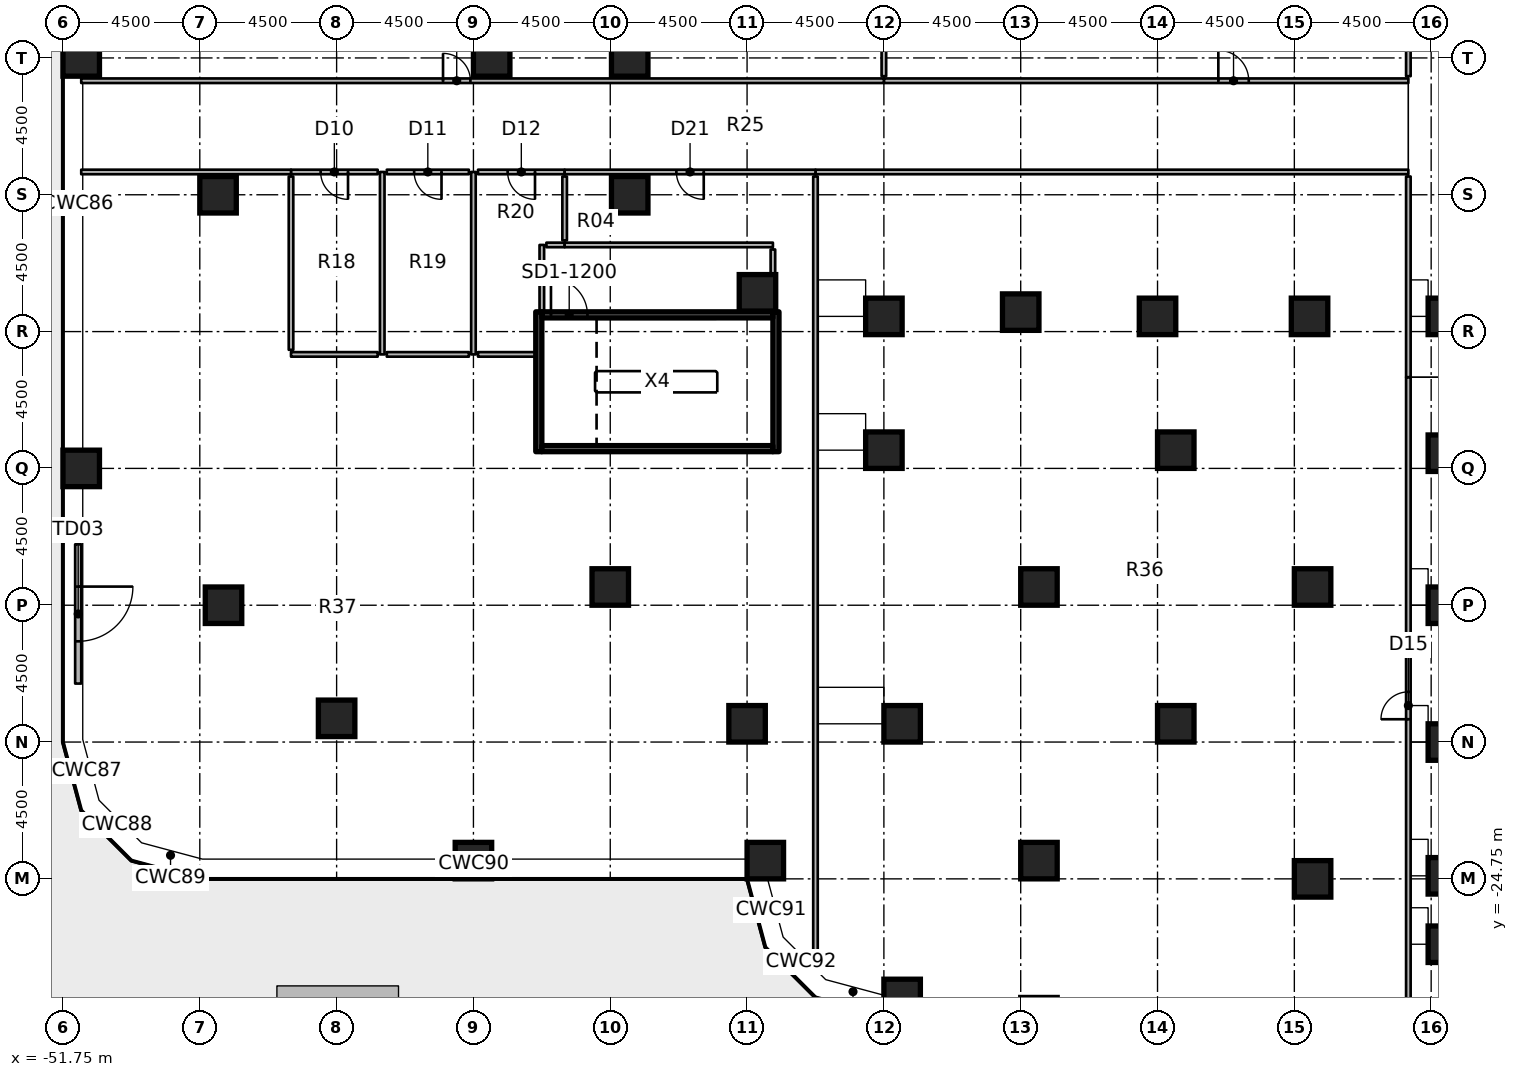
"""IFC4 building model, lengths in metres.
Left out: names, types, materials, properties, quantities, classifications, styles, units other than length and angle.
Written with IfcOpenShell. Run it as: python <this file> out.ifc"""

import sys

from ifc_helpers import new_model, si_unit, direction, frame, frame_2d, origin, origin_2d, place, context, subcontext, project, spatial, rectangle, extrude, element, fill, save


model = new_model("IFC4")
c1 = context("Model", 3, precision=1e-05, world=origin(), true_north=direction((0.0, 1.0)))
c2 = subcontext(c1, "Body", "Model", "MODEL_VIEW")
j1 = project(units=[si_unit("LENGTHUNIT", "METRE"), si_unit("PLANEANGLEUNIT", "RADIAN")], contexts=[c1])
p1 = place(None, origin())
s1 = spatial("IfcSite", under=j1, at=p1, CompositionType="ELEMENT")
p2 = place(p1, origin())
s2 = spatial("IfcBuilding", under=s1, at=p2, CompositionType="ELEMENT")
p3 = place(p2, frame((0.0, 0.0, 7.0)))
s3 = spatial("IfcBuildingStorey", under=s2, at=p3, CompositionType="ELEMENT", Elevation=7.0)
for number, where, z_axis, x_axis in (
    (1, (-51.15, -11.25, 0.0), (0.0, 0.0, 1.0), (1.0, 0.0, 0.0)),
    (2, (-51.15, 2.25, 0.0), (0.0, 0.0, 1.0), (1.0, 0.0, 0.0)),
    (3, (-46.47, -15.75, 0.0), (0.0, 0.0, 1.0), (1.0, 0.0, 0.0)),
    (4, (-46.65, -2.25, 0.0), (0.0, 0.0, 1.0), (1.0, 0.0, 0.0)),
    (5, (-42.75, -19.47, 0.0), (0.0, 0.0, 1.0), (1.0, 0.0, 0.0)),
    (6, (-38.25, -24.15, 0.0), (0.0, 0.0, 1.0), (1.0, 0.0, 0.0)),
    (7, (-37.65, 2.25, 0.0), (0.0, 0.0, 1.0), (1.0, 0.0, 0.0)),
    (8, (-33.75, -15.15, 0.0), (0.0, 0.0, 1.0), (1.0, 0.0, 0.0)),
    (9, (-33.11, -2.25, 0.0), (0.0, 0.0, 1.0), (1.0, 0.0, 0.0)),
    (10, (-33.11, 2.25, 0.0), (0.0, 0.0, 1.0), (1.0, 0.0, 0.0)),
    (11, (-28.65, -24.15, 0.0), (0.0, 0.0, 1.0), (1.0, 0.0, 0.0)),
    (12, (-29.25, -19.65, 0.0), (0.0, 0.0, 1.0), (1.0, 0.0, 0.0)),
    (13, (-28.908, -5.475, 0.0), (0.0, 0.0, 1.0), (1.0, 0.0, 0.0)),
    (14, (-24.15, -28.65, 0.0), (0.0, 0.0, 1.0), (1.0, 0.0, 0.0)),
    (15, (-24.15, -19.65, 0.0), (0.0, 0.0, 1.0), (1.0, 0.0, 0.0)),
    (16, (-24.75, -10.65, 0.0), (0.0, 0.0, 1.0), (1.0, 0.0, 0.0)),
    (17, (-24.75, -6.25, 0.0), (0.0, 0.0, 1.0), (1.0, 0.0, 0.0)),
    (18, (-19.65, -29.25, 0.0), (0.0, 0.0, 1.0), (1.0, 0.0, 0.0)),
    (19, (-19.65, -24.15, 0.0), (0.0, 0.0, 1.0), (1.0, 0.0, 0.0)),
    (20, (-19.65, -15.15, 0.0), (0.0, 0.0, 1.0), (1.0, 0.0, 0.0)),
    (21, (-20.25, -6.11, 0.0), (0.0, 0.0, 1.0), (1.0, 0.0, 0.0)),
    (22, (-15.15, -19.65, 0.0), (0.0, 0.0, 1.0), (1.0, 0.0, 0.0)),
    (23, (-15.15, -10.65, 0.0), (0.0, 0.0, 1.0), (1.0, 0.0, 0.0)),
    (24, (-15.75, -6.25, 0.0), (0.0, 0.0, 1.0), (1.0, 0.0, 0.0)),
    (25, (-10.65, -24.75, 0.0), (0.0, 0.0, 1.0), (1.0, 0.0, 0.0)),
    (26, (-10.65, -15.15, 0.0), (0.0, 0.0, 1.0), (1.0, 0.0, 0.0)),
    (27, (-10.75, -6.25, 0.0), (0.0, 0.0, 1.0), (1.0, 0.0, 0.0)),
    (28, (-6.25, -26.9, 0.0), (0.0, 0.0, 1.0), (1.0, 0.0, 0.0)),
    (29, (-6.25, -24.65, 0.0), (0.0, 0.0, 1.0), (1.0, 0.0, 0.0)),
    (30, (-6.25, -20.25, 0.0), (0.0, 0.0, 1.0), (1.0, 0.0, 0.0)),
    (31, (-6.25, -15.75, 0.0), (0.0, 0.0, 1.0), (1.0, 0.0, 0.0)),
    (32, (-6.25, -10.75, 0.0), (0.0, 0.0, 1.0), (1.0, 0.0, 0.0)),
    (33, (-6.25, -6.25, 0.0), (0.0, 0.0, 1.0), (1.0, 0.0, 0.0)),
):
    element("IfcColumn", number, at=place(p3, frame(where, z_axis=z_axis, x_axis=x_axis)), inside=s3, PredefinedType="COLUMN", context=c2, shape_type="SweptSolid", body=[
        extrude(rectangle(XDim=1.2, YDim=1.2, at=origin_2d()), origin(), (0.0, 0.0, 1.0), 4.55),
    ])
p4 = place(p3, frame((-51.25, -13.747, 0.0), z_axis=(0.0, 0.0, 1.0), x_axis=(0.0, -1.0, 0.0)))
e34 = element("IfcWall", 34, at=p4, inside=s3, PredefinedType="SOLIDWALL", context=c2, shape_type="SweptSolid", body=[
    extrude(rectangle(XDim=4.58, YDim=0.2, at=frame_2d((2.29, 0.0))), origin(), (0.0, 0.0, 1.0), 4.55),
])
p5 = place(p4, frame((1.39, 0.0, 0.0)))
e35 = element("IfcOpeningElement", 35, at=p5, cuts=e34, PredefinedType="OPENING", context=c2, shape_type="SweptSolid", body=[
    extrude(rectangle(XDim=1.8, YDim=2.4, at=frame_2d((0.9, 1.2))), frame((0.0, 0.11, 0.0), z_axis=(0.0, -1.0, 0.0), x_axis=(1.0, 0.0, 0.0)), (0.0, 0.0, 1.0), 0.22),
])
for number, where, z_axis, x_axis in (
    (36, (-36.1, -10.7, 0.0), (0.0, 0.0, 1.0), (0.0, 1.0, 0.0)),
    (37, (-28.3, -10.7, 0.0), (0.0, 0.0, 1.0), (0.0, 1.0, 0.0)),
):
    element("IfcWall", number, at=place(p3, frame(where, z_axis=z_axis, x_axis=x_axis)), inside=s3, PredefinedType="SHEAR", context=c2, shape_type="SweptSolid", body=[
        extrude(rectangle(XDim=4.6, YDim=0.2, at=frame_2d((2.3, 0.0))), origin(), (0.0, 0.0, 1.0), 4.55),
    ])
p6 = place(p3, frame((-36.0, -10.6, 0.0), z_axis=(0.0, 0.0, 1.0), x_axis=(1.0, 0.0, 0.0)))
e38 = element("IfcWall", 38, at=p6, inside=s3, PredefinedType="SHEAR", context=c2, shape_type="SweptSolid", body=[
    extrude(rectangle(XDim=7.6, YDim=0.2, at=frame_2d((3.8, 0.0))), origin(), (0.0, 0.0, 1.0), 4.55),
])
p7 = place(p3, frame((-36.0, -6.2, 0.0), z_axis=(0.0, 0.0, 1.0), x_axis=(1.0, 0.0, 0.0)))
e39 = element("IfcWall", 39, at=p7, inside=s3, PredefinedType="SHEAR", context=c2, shape_type="SweptSolid", body=[
    extrude(rectangle(XDim=7.6, YDim=0.2, at=frame_2d((3.8, 0.0))), origin(), (0.0, 0.0, 1.0), 4.55),
])
p8 = place(p7, frame((0.3, 0.0, 0.0)))
e40 = element("IfcOpeningElement", 40, at=p8, cuts=e39, PredefinedType="OPENING", context=c2, shape_type="SweptSolid", body=[
    extrude(rectangle(XDim=1.2, YDim=2.1, at=frame_2d((0.6, 1.05))), frame((0.0, 0.11, 0.0), z_axis=(0.0, -1.0, 0.0), x_axis=(1.0, 0.0, 0.0)), (0.0, 0.0, 1.0), 0.22),
])
p9 = place(p3, frame((-36.0, -6.1, 0.0), z_axis=(0.0, 0.0, 1.0), x_axis=(0.0, 1.0, 0.0)))
e41 = element("IfcWall", 41, at=p9, inside=s3, PredefinedType="PARTITIONING", context=c2, shape_type="SweptSolid", body=[
    extrude(rectangle(XDim=2.2, YDim=0.15, at=frame_2d((1.1, 0.0))), origin(), (0.0, 0.0, 1.0), 4.55),
])
p10 = place(p3, frame((-35.85, -3.9, 0.0), z_axis=(0.0, 0.0, 1.0), x_axis=(1.0, 0.0, 0.0)))
e42 = element("IfcWall", 42, at=p10, inside=s3, PredefinedType="PARTITIONING", context=c2, shape_type="SweptSolid", body=[
    extrude(rectangle(XDim=0.6, YDim=0.15, at=frame_2d((0.3, 0.0))), origin(), (0.0, 0.0, 1.0), 4.55),
])
p11 = place(p3, frame((-35.25, -3.9, 0.0), z_axis=(0.0, 0.0, 1.0), x_axis=(1.0, 0.0, 0.0)))
e43 = element("IfcWall", 43, at=p11, inside=s3, PredefinedType="PARTITIONING", context=c2, shape_type="SweptSolid", body=[
    extrude(rectangle(XDim=6.85, YDim=0.15, at=frame_2d((3.425, 0.0))), origin(), (0.0, 0.0, 1.0), 4.55),
])
p12 = place(p3, frame((-28.4, -4.05, 0.0), z_axis=(0.0, 0.0, 1.0), x_axis=(0.0, -1.0, 0.0)))
e44 = element("IfcWall", 44, at=p12, inside=s3, PredefinedType="PARTITIONING", context=c2, shape_type="SweptSolid", body=[
    extrude(rectangle(XDim=0.825, YDim=0.15, at=frame_2d((0.413, 0.0))), origin(), (0.0, 0.0, 1.0), 4.55),
])
p13 = place(p3, frame((-41.25, -1.5, 0.0), z_axis=(0.0, 0.0, 1.0), x_axis=(0.0, -1.0, 0.0)))
e45 = element("IfcWall", 45, at=p13, inside=s3, PredefinedType="PARTITIONING", context=c2, shape_type="SweptSolid", body=[
    extrude(rectangle(XDim=6.0, YDim=0.15, at=frame_2d((3.0, 0.0))), origin(), (0.0, 0.0, 1.0), 4.55),
])
p14 = place(p3, frame((-41.4, -1.5, 0.0), z_axis=(0.0, 0.0, 1.0), x_axis=(-1.0, 0.0, 0.0)))
e46 = element("IfcWall", 46, at=p14, inside=s3, PredefinedType="PARTITIONING", context=c2, shape_type="SweptSolid", body=[
    extrude(rectangle(XDim=2.85, YDim=0.15, at=frame_2d((1.425, 0.0))), origin(), (0.0, 0.0, 1.0), 4.55),
])
p15 = place(p14, frame((0.975, 0.0, 0.0)))
e47 = element("IfcOpeningElement", 47, at=p15, cuts=e46, PredefinedType="OPENING", context=c2, shape_type="SweptSolid", body=[
    extrude(rectangle(XDim=0.9, YDim=2.1, at=frame_2d((0.45, 1.05))), frame((0.0, 0.085, 0.0), z_axis=(0.0, -1.0, 0.0), x_axis=(1.0, 0.0, 0.0)), (0.0, 0.0, 1.0), 0.17),
])
p16 = place(p3, frame((-41.4, -7.5, 0.0), z_axis=(0.0, 0.0, 1.0), x_axis=(-1.0, 0.0, 0.0)))
e48 = element("IfcWall", 48, at=p16, inside=s3, PredefinedType="PARTITIONING", context=c2, shape_type="SweptSolid", body=[
    extrude(rectangle(XDim=2.85, YDim=0.15, at=frame_2d((1.425, 0.0))), origin(), (0.0, 0.0, 1.0), 4.55),
])
p17 = place(p3, frame((-44.25, -7.35, 0.0), z_axis=(0.0, 0.0, 1.0), x_axis=(0.0, 1.0, 0.0)))
e49 = element("IfcWall", 49, at=p17, inside=s3, PredefinedType="PARTITIONING", context=c2, shape_type="SweptSolid", body=[
    extrude(rectangle(XDim=5.7, YDim=0.15, at=frame_2d((2.85, 0.0))), origin(), (0.0, 0.0, 1.0), 4.55),
])
p18 = place(p3, frame((-38.25, -1.5, 0.0), z_axis=(0.0, 0.0, 1.0), x_axis=(0.0, -1.0, 0.0)))
e50 = element("IfcWall", 50, at=p18, inside=s3, PredefinedType="PARTITIONING", context=c2, shape_type="SweptSolid", body=[
    extrude(rectangle(XDim=6.0, YDim=0.15, at=frame_2d((3.0, 0.0))), origin(), (0.0, 0.0, 1.0), 4.55),
])
p19 = place(p3, frame((-38.4, -1.5, 0.0), z_axis=(0.0, 0.0, 1.0), x_axis=(-1.0, 0.0, 0.0)))
e51 = element("IfcWall", 51, at=p19, inside=s3, PredefinedType="PARTITIONING", context=c2, shape_type="SweptSolid", body=[
    extrude(rectangle(XDim=2.7, YDim=0.15, at=frame_2d((1.35, 0.0))), origin(), (0.0, 0.0, 1.0), 4.55),
])
p20 = place(p19, frame((0.9, 0.0, 0.0)))
e52 = element("IfcOpeningElement", 52, at=p20, cuts=e51, PredefinedType="OPENING", context=c2, shape_type="SweptSolid", body=[
    extrude(rectangle(XDim=0.9, YDim=2.1, at=frame_2d((0.45, 1.05))), frame((0.0, 0.085, 0.0), z_axis=(0.0, -1.0, 0.0), x_axis=(1.0, 0.0, 0.0)), (0.0, 0.0, 1.0), 0.17),
])
p21 = place(p3, frame((-38.4, -7.5, 0.0), z_axis=(0.0, 0.0, 1.0), x_axis=(-1.0, 0.0, 0.0)))
e53 = element("IfcWall", 53, at=p21, inside=s3, PredefinedType="PARTITIONING", context=c2, shape_type="SweptSolid", body=[
    extrude(rectangle(XDim=2.7, YDim=0.15, at=frame_2d((1.35, 0.0))), origin(), (0.0, 0.0, 1.0), 4.55),
])
p22 = place(p3, frame((-35.25, -1.5, 0.0), z_axis=(0.0, 0.0, 1.0), x_axis=(-1.0, 0.0, 0.0)))
e54 = element("IfcWall", 54, at=p22, inside=s3, PredefinedType="PARTITIONING", context=c2, shape_type="SweptSolid", body=[
    extrude(rectangle(XDim=2.85, YDim=0.15, at=frame_2d((1.425, 0.0))), origin(), (0.0, 0.0, 1.0), 4.55),
])
p23 = place(p22, frame((0.975, 0.0, 0.0)))
e55 = element("IfcOpeningElement", 55, at=p23, cuts=e54, PredefinedType="OPENING", context=c2, shape_type="SweptSolid", body=[
    extrude(rectangle(XDim=0.9, YDim=2.1, at=frame_2d((0.45, 1.05))), frame((0.0, 0.085, 0.0), z_axis=(0.0, -1.0, 0.0), x_axis=(1.0, 0.0, 0.0)), (0.0, 0.0, 1.0), 0.17),
])
p24 = place(p3, frame((-36.2, -7.5, 0.0), z_axis=(0.0, 0.0, 1.0), x_axis=(-1.0, 0.0, 0.0)))
e56 = element("IfcWall", 56, at=p24, inside=s3, PredefinedType="PARTITIONING", context=c2, shape_type="SweptSolid", body=[
    extrude(rectangle(XDim=1.9, YDim=0.15, at=frame_2d((0.95, 0.0))), origin(), (0.0, 0.0, 1.0), 4.55),
])
p25 = place(p3, frame((-35.25, -1.65, 0.0), z_axis=(0.0, 0.0, 1.0), x_axis=(0.0, -1.0, 0.0)))
e57 = element("IfcWall", 57, at=p25, inside=s3, PredefinedType="PARTITIONING", context=c2, shape_type="SweptSolid", body=[
    extrude(rectangle(XDim=2.1, YDim=0.15, at=frame_2d((1.05, 0.0))), origin(), (0.0, 0.0, 1.0), 4.55),
])
p26 = place(p3, frame((-7.5, -32.25, 0.0), z_axis=(0.0, 0.0, 1.0), x_axis=(0.0, 1.0, 0.0)))
e58 = element("IfcWall", 58, at=p26, inside=s3, PredefinedType="PARTITIONING", context=c2, shape_type="SweptSolid", body=[
    extrude(rectangle(XDim=24.0, YDim=0.15, at=frame_2d((12.0, 0.0))), origin(), (0.0, 0.0, 1.0), 4.55),
])
p27 = place(p26, frame((12.75, 0.0, 0.0)))
e59 = element("IfcOpeningElement", 59, at=p27, cuts=e58, PredefinedType="OPENING", context=c2, shape_type="SweptSolid", body=[
    extrude(rectangle(XDim=0.9, YDim=2.1, at=frame_2d((0.45, 1.05))), frame((0.0, 0.085, 0.0), z_axis=(0.0, -1.0, 0.0), x_axis=(1.0, 0.0, 0.0)), (0.0, 0.0, 1.0), 0.17),
])
p28 = place(p3, frame((-24.75, 1.5, 0.0), z_axis=(0.0, 0.0, 1.0), x_axis=(1.0, 0.0, 0.0)))
e60 = element("IfcWall", 60, at=p28, inside=s3, PredefinedType="PARTITIONING", context=c2, shape_type="SweptSolid", body=[
    extrude(rectangle(XDim=17.25, YDim=0.15, at=frame_2d((8.625, 0.0))), origin(), (0.0, 0.0, 1.0), 4.55),
])
p29 = place(p28, frame((11.0, 0.0, 0.0)))
e61 = element("IfcOpeningElement", 61, at=p29, cuts=e60, PredefinedType="OPENING", context=c2, shape_type="SweptSolid", body=[
    extrude(rectangle(XDim=1.0, YDim=2.1, at=frame_2d((0.5, 1.05))), frame((0.0, 0.085, 0.0), z_axis=(0.0, -1.0, 0.0), x_axis=(1.0, 0.0, 0.0)), (0.0, 0.0, 1.0), 0.17),
])
p30 = place(p3, frame((-51.15, 1.5, 0.0), z_axis=(0.0, 0.0, 1.0), x_axis=(1.0, 0.0, 0.0)))
e62 = element("IfcWall", 62, at=p30, inside=s3, PredefinedType="PARTITIONING", context=c2, shape_type="SweptSolid", body=[
    extrude(rectangle(XDim=26.4, YDim=0.15, at=frame_2d((13.2, 0.0))), origin(), (0.0, 0.0, 1.0), 4.55),
])
p31 = place(p30, frame((11.9, 0.0, 0.0)))
e63 = element("IfcOpeningElement", 63, at=p31, cuts=e62, PredefinedType="OPENING", context=c2, shape_type="SweptSolid", body=[
    extrude(rectangle(XDim=0.9, YDim=2.1, at=frame_2d((0.45, 1.05))), frame((0.0, 0.085, 0.0), z_axis=(0.0, -1.0, 0.0), x_axis=(1.0, 0.0, 0.0)), (0.0, 0.0, 1.0), 0.17),
])
p32 = place(p3, frame((-7.5, -1.5, 0.0), z_axis=(0.0, 0.0, 1.0), x_axis=(-1.0, 0.0, 0.0)))
e64 = element("IfcWall", 64, at=p32, inside=s3, PredefinedType="PARTITIONING", context=c2, shape_type="SweptSolid", body=[
    extrude(rectangle(XDim=19.5, YDim=0.15, at=frame_2d((9.75, 0.0))), origin(), (0.0, 0.0, 1.0), 4.55),
])
p33 = place(p3, frame((-44.25, -1.5, 0.0), z_axis=(0.0, 0.0, 1.0), x_axis=(-1.0, 0.0, 0.0)))
e65 = element("IfcWall", 65, at=p33, inside=s3, PredefinedType="PARTITIONING", context=c2, shape_type="SweptSolid", body=[
    extrude(rectangle(XDim=6.9, YDim=0.15, at=frame_2d((3.45, 0.0))), origin(), (0.0, 0.0, 1.0), 4.55),
])
p34 = place(p3, frame((-27.0, -1.5, 0.0), z_axis=(0.0, 0.0, 1.0), x_axis=(-1.0, 0.0, 0.0)))
e66 = element("IfcWall", 66, at=p34, inside=s3, PredefinedType="PARTITIONING", context=c2, shape_type="SweptSolid", body=[
    extrude(rectangle(XDim=8.25, YDim=0.15, at=frame_2d((4.125, 0.0))), origin(), (0.0, 0.0, 1.0), 4.55),
])
p35 = place(p34, frame((3.675, 0.0, 0.0)))
e67 = element("IfcOpeningElement", 67, at=p35, cuts=e66, PredefinedType="OPENING", context=c2, shape_type="SweptSolid", body=[
    extrude(rectangle(XDim=0.9, YDim=2.1, at=frame_2d((0.45, 1.05))), frame((0.0, 0.085, 0.0), z_axis=(0.0, -1.0, 0.0), x_axis=(1.0, 0.0, 0.0)), (0.0, 0.0, 1.0), 0.17),
])
p36 = place(p3, frame((-24.75, 1.65, 0.0), z_axis=(0.0, 0.0, 1.0), x_axis=(0.0, 1.0, 0.0)))
e68 = element("IfcWall", 68, at=p36, inside=s3, PredefinedType="PARTITIONING", context=c2, shape_type="SweptSolid", body=[
    extrude(rectangle(XDim=4.0, YDim=0.15, at=frame_2d((2.0, 0.0))), origin(), (0.0, 0.0, 1.0), 4.55),
])
p37 = place(p3, frame((-7.5, 8.25, 0.0), z_axis=(0.0, 0.0, 1.0), x_axis=(0.0, -1.0, 0.0)))
e69 = element("IfcWall", 69, at=p37, inside=s3, PredefinedType="PARTITIONING", context=c2, shape_type="SweptSolid", body=[
    extrude(rectangle(XDim=6.6, YDim=0.15, at=frame_2d((3.3, 0.0))), origin(), (0.0, 0.0, 1.0), 4.55),
])
p38 = place(p3, frame((-27.0, -27.797, 0.0), z_axis=(0.0, 0.0, 1.0), x_axis=(0.0, 1.0, 0.0)))
e70 = element("IfcWall", 70, at=p38, inside=s3, PredefinedType="PARTITIONING", context=c2, shape_type="SweptSolid", body=[
    extrude(rectangle(XDim=26.147, YDim=0.15, at=frame_2d((13.074, 0.0))), origin(), (0.0, 0.0, 1.0), 4.55),
])
p39 = place(p3, frame((-7.5, -1.65, 0.0), z_axis=(0.0, 0.0, 1.0), x_axis=(0.0, -1.0, 0.0)))
e71 = element("IfcWall", 71, at=p39, inside=s3, PredefinedType="PARTITIONING", context=c2, shape_type="SweptSolid", body=[
    extrude(rectangle(XDim=6.6, YDim=0.15, at=frame_2d((3.3, 0.0))), origin(), (0.0, 0.0, 1.0), 4.55),
])
p40 = place(p5, origin())
e72 = element("IfcDoor", 72, at=p40, inside=s3, OperationType="SINGLE_SWING_LEFT", PredefinedType="DOOR", context=c2, shape_type="SweptSolid", body=[
    extrude(rectangle(XDim=1.8, YDim=2.4, at=frame_2d((0.9, 1.2))), frame((0.0, 0.025, 0.0), z_axis=(0.0, -1.0, 0.0), x_axis=(1.0, 0.0, 0.0)), (0.0, 0.0, 1.0), 0.05),
])
fill(e35, e72)
p41 = place(p8, origin())
e73 = element("IfcDoor", 73, at=p41, inside=s3, OperationType="SINGLE_SWING_RIGHT", PredefinedType="DOOR", context=c2, shape_type="SweptSolid", body=[
    extrude(rectangle(XDim=1.2, YDim=2.1, at=frame_2d((0.6, 1.05))), frame((0.0, 0.025, 0.0), z_axis=(0.0, -1.0, 0.0), x_axis=(1.0, 0.0, 0.0)), (0.0, 0.0, 1.0), 0.05),
])
fill(e40, e73)
p42 = place(p15, origin())
e74 = element("IfcDoor", 74, at=p42, inside=s3, OperationType="SINGLE_SWING_LEFT", PredefinedType="DOOR", context=c2, shape_type="SweptSolid", body=[
    extrude(rectangle(XDim=0.9, YDim=2.1, at=frame_2d((0.45, 1.05))), frame((0.0, 0.025, 0.0), z_axis=(0.0, -1.0, 0.0), x_axis=(1.0, 0.0, 0.0)), (0.0, 0.0, 1.0), 0.05),
])
fill(e47, e74)
p43 = place(p20, origin())
e75 = element("IfcDoor", 75, at=p43, inside=s3, OperationType="SINGLE_SWING_LEFT", PredefinedType="DOOR", context=c2, shape_type="SweptSolid", body=[
    extrude(rectangle(XDim=0.9, YDim=2.1, at=frame_2d((0.45, 1.05))), frame((0.0, 0.025, 0.0), z_axis=(0.0, -1.0, 0.0), x_axis=(1.0, 0.0, 0.0)), (0.0, 0.0, 1.0), 0.05),
])
fill(e52, e75)
p44 = place(p23, origin())
e76 = element("IfcDoor", 76, at=p44, inside=s3, OperationType="SINGLE_SWING_LEFT", PredefinedType="DOOR", context=c2, shape_type="SweptSolid", body=[
    extrude(rectangle(XDim=0.9, YDim=2.1, at=frame_2d((0.45, 1.05))), frame((0.0, 0.025, 0.0), z_axis=(0.0, -1.0, 0.0), x_axis=(1.0, 0.0, 0.0)), (0.0, 0.0, 1.0), 0.05),
])
fill(e55, e76)
p45 = place(p27, origin())
e77 = element("IfcDoor", 77, at=p45, inside=s3, OperationType="SINGLE_SWING_LEFT", PredefinedType="DOOR", context=c2, shape_type="SweptSolid", body=[
    extrude(rectangle(XDim=0.9, YDim=2.1, at=frame_2d((0.45, 1.05))), frame((0.0, 0.025, 0.0), z_axis=(0.0, -1.0, 0.0), x_axis=(1.0, 0.0, 0.0)), (0.0, 0.0, 1.0), 0.05),
])
fill(e59, e77)
p46 = place(p29, origin())
e78 = element("IfcDoor", 78, at=p46, inside=s3, OperationType="SINGLE_SWING_LEFT", PredefinedType="DOOR", context=c2, shape_type="SweptSolid", body=[
    extrude(rectangle(XDim=1.0, YDim=2.1, at=frame_2d((0.5, 1.05))), frame((0.0, 0.025, 0.0), z_axis=(0.0, -1.0, 0.0), x_axis=(1.0, 0.0, 0.0)), (0.0, 0.0, 1.0), 0.05),
])
fill(e61, e78)
p47 = place(p31, origin())
e79 = element("IfcDoor", 79, at=p47, inside=s3, OperationType="SINGLE_SWING_LEFT", PredefinedType="DOOR", context=c2, shape_type="SweptSolid", body=[
    extrude(rectangle(XDim=0.9, YDim=2.1, at=frame_2d((0.45, 1.05))), frame((0.0, 0.025, 0.0), z_axis=(0.0, -1.0, 0.0), x_axis=(1.0, 0.0, 0.0)), (0.0, 0.0, 1.0), 0.05),
])
fill(e63, e79)
p48 = place(p35, origin())
e80 = element("IfcDoor", 80, at=p48, inside=s3, OperationType="SINGLE_SWING_LEFT", PredefinedType="DOOR", context=c2, shape_type="SweptSolid", body=[
    extrude(rectangle(XDim=0.9, YDim=2.1, at=frame_2d((0.45, 1.05))), frame((0.0, 0.025, 0.0), z_axis=(0.0, -1.0, 0.0), x_axis=(1.0, 0.0, 0.0)), (0.0, 0.0, 1.0), 0.05),
])
fill(e67, e80)
save(model, sys.argv[1])
